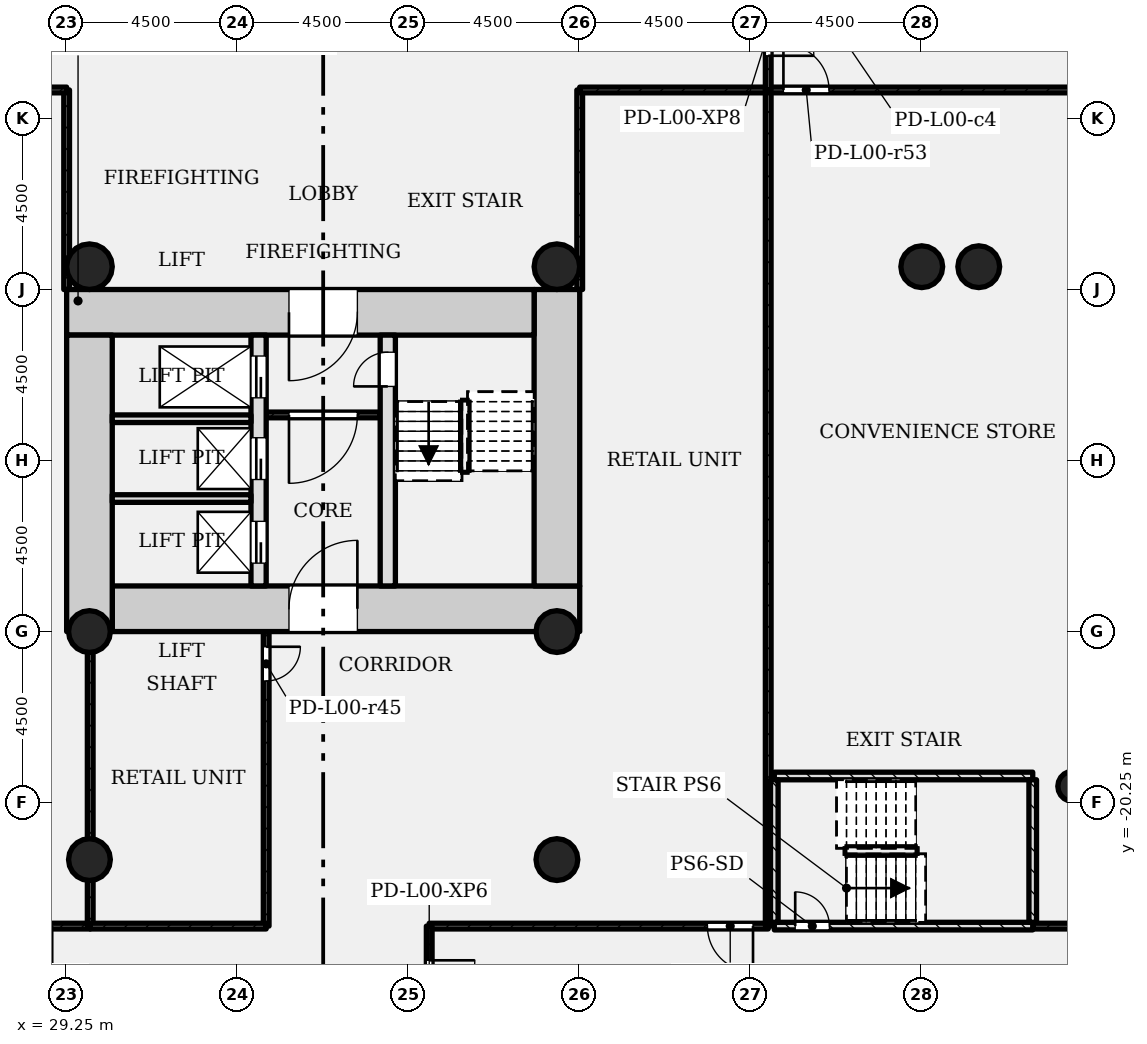
"""IFC4 building model, lengths in metres.
Left out: names, types, materials, properties, quantities, classifications, styles, units other than length and angle.
Written with IfcOpenShell. Run it as: python <this file> out.ifc"""

import sys

from ifc_helpers import new_model, si_unit, direction, frame, frame_2d, origin, origin_2d, place, context, subcontext, project, spatial, rectangle, hollow_circle, extrude, element, fill, save


model = new_model("IFC4")
c1 = context("Model", 3, precision=1e-05, world=origin(), true_north=direction((0.0, 1.0)))
c2 = subcontext(c1, "Body", "Model", "MODEL_VIEW")
j1 = project(units=[si_unit("LENGTHUNIT", "METRE"), si_unit("PLANEANGLEUNIT", "RADIAN")], contexts=[c1])
p1 = place(None, origin())
s1 = spatial("IfcSite", under=j1, at=p1, CompositionType="ELEMENT")
p2 = place(p1, origin())
s2 = spatial("IfcBuilding", under=s1, at=p2, CompositionType="ELEMENT")
p3 = place(p2, origin())
s3 = spatial("IfcBuildingStorey", under=s2, at=p3, CompositionType="ELEMENT", Elevation=0.0)
p4 = place(p3, frame((30.45, -15.15, -0.4), z_axis=(0.0, 0.0, 1.0), x_axis=(1.0, 0.0, 0.0)))
e1 = element("IfcWall", 1, at=p4, inside=s3, PredefinedType="SHEAR", context=c2, shape_type="SweptSolid", body=[
    extrude(rectangle(XDim=12.3, YDim=1.2, at=frame_2d((6.15, 0.0))), origin(), (0.0, 0.0, 1.0), 6.4),
])
p5 = place(p4, frame((4.65, 0.0, 0.4)))
e2 = element("IfcOpeningElement", 2, at=p5, cuts=e1, PredefinedType="OPENING", context=c2, shape_type="SweptSolid", body=[
    extrude(rectangle(XDim=1.8, YDim=2.1, at=frame_2d((0.9, 1.05))), frame((0.0, 0.61, 0.0), z_axis=(0.0, -1.0, 0.0), x_axis=(1.0, 0.0, 0.0)), (0.0, 0.0, 1.0), 1.22),
])
p6 = place(p3, frame((42.15, -14.55, -0.4), z_axis=(0.0, 0.0, 1.0), x_axis=(0.0, 1.0, 0.0)))
e3 = element("IfcWall", 3, at=p6, inside=s3, PredefinedType="SHEAR", context=c2, shape_type="SweptSolid", body=[
    extrude(rectangle(XDim=7.8, YDim=1.2, at=frame_2d((3.9, 0.0))), origin(), (0.0, 0.0, 1.0), 6.4),
])
p7 = place(p3, frame((41.55, -7.35, -0.4), z_axis=(0.0, 0.0, 1.0), x_axis=(-1.0, 0.0, 0.0)))
e4 = element("IfcWall", 4, at=p7, inside=s3, PredefinedType="SHEAR", context=c2, shape_type="SweptSolid", body=[
    extrude(rectangle(XDim=12.3, YDim=1.2, at=frame_2d((6.15, 0.0))), origin(), (0.0, 0.0, 1.0), 6.4),
])
p8 = place(p7, frame((4.65, 0.0, 0.4)))
e5 = element("IfcOpeningElement", 5, at=p8, cuts=e4, PredefinedType="OPENING", context=c2, shape_type="SweptSolid", body=[
    extrude(rectangle(XDim=1.8, YDim=2.1, at=frame_2d((0.9, 1.05))), frame((0.0, 0.61, 0.0), z_axis=(0.0, -1.0, 0.0), x_axis=(1.0, 0.0, 0.0)), (0.0, 0.0, 1.0), 1.22),
])
p9 = place(p3, frame((29.85, -7.95, -0.4), z_axis=(0.0, 0.0, 1.0), x_axis=(0.0, -1.0, 0.0)))
e6 = element("IfcWall", 6, at=p9, inside=s3, PredefinedType="SHEAR", context=c2, shape_type="SweptSolid", body=[
    extrude(rectangle(XDim=7.8, YDim=1.2, at=frame_2d((3.9, 0.0))), origin(), (0.0, 0.0, 1.0), 6.4),
])
p10 = place(p3, frame((34.3, -14.55, -0.4), z_axis=(0.0, 0.0, 1.0), x_axis=(0.0, 1.0, 0.0)))
e7 = element("IfcWall", 7, at=p10, inside=s3, PredefinedType="SHEAR", context=c2, shape_type="SweptSolid", body=[
    extrude(rectangle(XDim=6.6, YDim=0.4, at=frame_2d((3.3, 0.0))), origin(), (0.0, 0.0, 1.0), 6.4),
])
p11 = place(p10, frame((4.95, 0.0, 0.4)))
e8 = element("IfcOpeningElement", 8, at=p11, cuts=e7, PredefinedType="OPENING", context=c2, shape_type="SweptSolid", body=[
    extrude(rectangle(XDim=1.1, YDim=2.1, at=frame_2d((0.55, 1.05))), frame((0.0, 0.21, 0.0), z_axis=(0.0, -1.0, 0.0), x_axis=(1.0, 0.0, 0.0)), (0.0, 0.0, 1.0), 0.42),
])
p12 = place(p10, frame((2.8, 0.0, 0.4)))
e9 = element("IfcOpeningElement", 9, at=p12, cuts=e7, PredefinedType="OPENING", context=c2, shape_type="SweptSolid", body=[
    extrude(rectangle(XDim=1.1, YDim=2.1, at=frame_2d((0.55, 1.05))), frame((0.0, 0.21, 0.0), z_axis=(0.0, -1.0, 0.0), x_axis=(1.0, 0.0, 0.0)), (0.0, 0.0, 1.0), 0.42),
])
p13 = place(p10, frame((0.6, 0.0, 0.4)))
e10 = element("IfcOpeningElement", 10, at=p13, cuts=e7, PredefinedType="OPENING", context=c2, shape_type="SweptSolid", body=[
    extrude(rectangle(XDim=1.1, YDim=2.1, at=frame_2d((0.55, 1.05))), frame((0.0, 0.21, 0.0), z_axis=(0.0, -1.0, 0.0), x_axis=(1.0, 0.0, 0.0)), (0.0, 0.0, 1.0), 0.42),
])
p14 = place(p3, frame((37.7, -14.55, -0.4), z_axis=(0.0, 0.0, 1.0), x_axis=(0.0, 1.0, 0.0)))
e11 = element("IfcWall", 11, at=p14, inside=s3, PredefinedType="SHEAR", context=c2, shape_type="SweptSolid", body=[
    extrude(rectangle(XDim=6.6, YDim=0.4, at=frame_2d((3.3, 0.0))), origin(), (0.0, 0.0, 1.0), 6.4),
])
p15 = place(p14, frame((5.25, 0.0, 0.4)))
e12 = element("IfcOpeningElement", 12, at=p15, cuts=e11, PredefinedType="OPENING", context=c2, shape_type="SweptSolid", body=[
    extrude(rectangle(XDim=0.9, YDim=2.1, at=frame_2d((0.45, 1.05))), frame((0.0, 0.21, 0.0), z_axis=(0.0, -1.0, 0.0), x_axis=(1.0, 0.0, 0.0)), (0.0, 0.0, 1.0), 0.42),
])
for number, where, z_axis, x_axis in (
    (13, (42.15, -15.75, -0.4), (0.0, 0.0, 1.0), (1.0, 0.0, 0.0)),
    (14, (29.85, -15.75, -0.4), (0.0, 0.0, 1.0), (1.0, 0.0, 0.0)),
    (15, (42.15, -21.75, -0.4), (0.0, 0.0, 1.0), (1.0, 0.0, 0.0)),
    (16, (29.85, -21.75, -0.4), (0.0, 0.0, 1.0), (1.0, 0.0, 0.0)),
    (17, (51.75, -6.15, -0.4), (0.0, 0.0, 1.0), (1.0, 0.0, 0.0)),
    (18, (53.25, -6.15, -0.4), (0.0, 0.0, 1.0), (1.0, 0.0, 0.0)),
):
    element("IfcColumn", number, at=place(p3, frame(where, z_axis=z_axis, x_axis=x_axis)), inside=s3, PredefinedType="COLUMN", context=c2, shape_type="SweptSolid", body=[
        extrude(hollow_circle(Radius=0.55, WallThickness=0.04, at=origin_2d()), origin(), (0.0, 0.0, 1.0), 6.4),
    ])
for number, where, z_axis, x_axis in (
    (19, (42.15, -6.15, -0.4), (0.0, 0.0, 1.0), (1.0, 0.0, 0.0)),
    (20, (29.85, -6.15, -0.4), (0.0, 0.0, 1.0), (1.0, 0.0, 0.0)),
):
    element("IfcColumn", number, at=place(p3, frame(where, z_axis=z_axis, x_axis=x_axis)), inside=s3, PredefinedType="COLUMN", context=c2, shape_type="SweptSolid", body=[
        extrude(hollow_circle(Radius=0.6, WallThickness=0.045, at=origin_2d()), origin(), (0.0, 0.0, 1.0), 6.4),
    ])
p16 = place(p3, frame((55.73, -19.821, -0.4), z_axis=(0.0, 0.0, 1.0), x_axis=(1.0, 0.0, 0.0)))
e21 = element("IfcColumn", 21, at=p16, inside=s3, PredefinedType="COLUMN", context=c2, shape_type="SweptSolid", body=[
    extrude(hollow_circle(Radius=0.4, WallThickness=0.028, at=origin_2d()), origin(), (0.0, 0.0, 1.0), 6.4),
])
p17 = place(p3, frame((34.5, -10.05, 0.0), z_axis=(0.0, 0.0, 1.0), x_axis=(1.0, 0.0, 0.0)))
e22 = element("IfcWall", 22, at=p17, inside=s3, PredefinedType="PARTITIONING", context=c2, shape_type="SweptSolid", body=[
    extrude(rectangle(XDim=3.0, YDim=0.15, at=frame_2d((1.5, 0.0))), origin(), (0.0, 0.0, 1.0), 5.58),
])
p18 = place(p17, frame((0.6, 0.0, 0.0)))
e23 = element("IfcOpeningElement", 23, at=p18, cuts=e22, PredefinedType="OPENING", context=c2, shape_type="SweptSolid", body=[
    extrude(rectangle(XDim=1.8, YDim=2.1, at=frame_2d((0.9, 1.05))), frame((0.0, 0.085, 0.0), z_axis=(0.0, -1.0, 0.0), x_axis=(1.0, 0.0, 0.0)), (0.0, 0.0, 1.0), 0.17),
])
for number, where, z_axis, x_axis in (
    (24, (30.45, -10.15, 0.0), (0.0, 0.0, 1.0), (1.0, 0.0, 0.0)),
    (25, (30.45, -12.25, 0.0), (0.0, 0.0, 1.0), (1.0, 0.0, 0.0)),
):
    element("IfcWall", number, at=place(p3, frame(where, z_axis=z_axis, x_axis=x_axis)), inside=s3, PredefinedType="SOLIDWALL", context=c2, shape_type="SweptSolid", body=[
        extrude(rectangle(XDim=3.65, YDim=0.2, at=frame_2d((1.825, 0.0))), origin(), (0.0, 0.0, 1.0), 5.58),
    ])
p19 = place(p3, frame((29.25, -1.5, 0.0), z_axis=(0.0, 0.0, 1.0), x_axis=(0.0, -1.0, 0.0)))
e26 = element("IfcWall", 26, at=p19, inside=s3, PredefinedType="PARTITIONING", context=c2, shape_type="SweptSolid", body=[
    extrude(rectangle(XDim=5.25, YDim=0.15, at=frame_2d((2.625, 0.0))), origin(), (0.0, 0.0, 1.0), 5.58),
])
p20 = place(p3, frame((29.87, -23.5, 0.0), z_axis=(0.0, 0.0, 1.0), x_axis=(-1.0, 0.0, 0.0)))
e27 = element("IfcWall", 27, at=p20, inside=s3, PredefinedType="PARTITIONING", context=c2, shape_type="SweptSolid", body=[
    extrude(rectangle(XDim=8.92, YDim=0.15, at=frame_2d((4.46, 0.0))), origin(), (0.0, 0.0, 1.0), 5.58),
])
p21 = place(p20, frame((1.0, 0.0, 0.0)))
e28 = element("IfcOpeningElement", 28, at=p21, cuts=e27, PredefinedType="OPENING", context=c2, shape_type="SweptSolid", body=[
    extrude(rectangle(XDim=1.2, YDim=2.1, at=frame_2d((0.6, 1.05))), frame((0.0, 0.085, 0.0), z_axis=(0.0, -1.0, 0.0), x_axis=(1.0, 0.0, 0.0)), (0.0, 0.0, 1.0), 0.17),
])
p22 = place(p3, frame((20.95, -1.5, 0.0), z_axis=(0.0, 0.0, 1.0), x_axis=(1.0, 0.0, 0.0)))
e29 = element("IfcWall", 29, at=p22, inside=s3, PredefinedType="PARTITIONING", context=c2, shape_type="SweptSolid", body=[
    extrude(rectangle(XDim=8.3, YDim=0.15, at=frame_2d((4.15, 0.0))), origin(), (0.0, 0.0, 1.0), 5.58),
])
p23 = place(p3, frame((29.87, -15.75, 0.0), z_axis=(0.0, 0.0, 1.0), x_axis=(0.0, -1.0, 0.0)))
e30 = element("IfcWall", 30, at=p23, inside=s3, PredefinedType="PARTITIONING", context=c2, shape_type="SweptSolid", body=[
    extrude(rectangle(XDim=7.75, YDim=0.15, at=frame_2d((3.875, 0.0))), origin(), (0.0, 0.0, 1.0), 5.58),
])
p24 = place(p3, frame((34.5, -15.75, 0.0), z_axis=(0.0, 0.0, 1.0), x_axis=(0.0, -1.0, 0.0)))
e31 = element("IfcWall", 31, at=p24, inside=s3, PredefinedType="PARTITIONING", context=c2, shape_type="SweptSolid", body=[
    extrude(rectangle(XDim=7.75, YDim=0.15, at=frame_2d((3.875, 0.0))), origin(), (0.0, 0.0, 1.0), 5.58),
])
p25 = place(p24, frame((0.4, 0.0, 0.0)))
e32 = element("IfcOpeningElement", 32, at=p25, cuts=e31, PredefinedType="OPENING", context=c2, shape_type="SweptSolid", body=[
    extrude(rectangle(XDim=0.9, YDim=2.1, at=frame_2d((0.45, 1.05))), frame((0.0, 0.085, 0.0), z_axis=(0.0, -1.0, 0.0), x_axis=(1.0, 0.0, 0.0)), (0.0, 0.0, 1.0), 0.17),
])
p26 = place(p3, frame((34.5, -23.5, 0.0), z_axis=(0.0, 0.0, 1.0), x_axis=(-1.0, 0.0, 0.0)))
e33 = element("IfcWall", 33, at=p26, inside=s3, PredefinedType="PARTITIONING", context=c2, shape_type="SweptSolid", body=[
    extrude(rectangle(XDim=4.63, YDim=0.15, at=frame_2d((2.315, 0.0))), origin(), (0.0, 0.0, 1.0), 5.58),
])
p27 = place(p3, frame((42.75, -6.75, 0.0), z_axis=(0.0, 0.0, 1.0), x_axis=(0.0, 1.0, 0.0)))
e34 = element("IfcWall", 34, at=p27, inside=s3, PredefinedType="PARTITIONING", context=c2, shape_type="SweptSolid", body=[
    extrude(rectangle(XDim=5.25, YDim=0.15, at=frame_2d((2.625, 0.0))), origin(), (0.0, 0.0, 1.0), 5.58),
])
p28 = place(p3, frame((42.75, -1.5, 0.0), z_axis=(0.0, 0.0, 1.0), x_axis=(1.0, 0.0, 0.0)))
e35 = element("IfcWall", 35, at=p28, inside=s3, PredefinedType="PARTITIONING", context=c2, shape_type="SweptSolid", body=[
    extrude(rectangle(XDim=4.96, YDim=0.15, at=frame_2d((2.48, 0.0))), origin(), (0.0, 0.0, 1.0), 5.58),
])
p29 = place(p3, frame((47.71, -23.5, 0.0), z_axis=(0.0, 0.0, 1.0), x_axis=(-1.0, 0.0, 0.0)))
e36 = element("IfcWall", 36, at=p29, inside=s3, PredefinedType="PARTITIONING", context=c2, shape_type="SweptSolid", body=[
    extrude(rectangle(XDim=8.92, YDim=0.15, at=frame_2d((4.46, 0.0))), origin(), (0.0, 0.0, 1.0), 5.58),
])
p30 = place(p29, frame((0.4, 0.0, 0.0)))
e37 = element("IfcOpeningElement", 37, at=p30, cuts=e36, PredefinedType="OPENING", context=c2, shape_type="SweptSolid", body=[
    extrude(rectangle(XDim=1.2, YDim=2.1, at=frame_2d((0.6, 1.05))), frame((0.0, 0.085, 0.0), z_axis=(0.0, -1.0, 0.0), x_axis=(1.0, 0.0, 0.0)), (0.0, 0.0, 1.0), 0.17),
])
p31 = place(p3, frame((47.71, -1.5, 0.0), z_axis=(0.0, 0.0, 1.0), x_axis=(0.0, -1.0, 0.0)))
e38 = element("IfcWall", 38, at=p31, inside=s3, PredefinedType="PARTITIONING", context=c2, shape_type="SweptSolid", body=[
    extrude(rectangle(XDim=22.0, YDim=0.15, at=frame_2d((11.0, 0.0))), origin(), (0.0, 0.0, 1.0), 5.58),
])
p32 = place(p3, frame((56.63, -23.5, 0.0), z_axis=(0.0, 0.0, 1.0), x_axis=(-1.0, 0.0, 0.0)))
e39 = element("IfcWall", 39, at=p32, inside=s3, PredefinedType="PARTITIONING", context=c2, shape_type="SweptSolid", body=[
    extrude(rectangle(XDim=1.96, YDim=0.15, at=frame_2d((0.98, 0.0))), origin(), (0.0, 0.0, 1.0), 5.58),
])
p33 = place(p3, frame((47.71, -1.5, 0.0), z_axis=(0.0, 0.0, 1.0), x_axis=(1.0, 0.0, 0.0)))
e40 = element("IfcWall", 40, at=p33, inside=s3, PredefinedType="PARTITIONING", context=c2, shape_type="SweptSolid", body=[
    extrude(rectangle(XDim=8.92, YDim=0.15, at=frame_2d((4.46, 0.0))), origin(), (0.0, 0.0, 1.0), 5.58),
])
p34 = place(p33, frame((0.4, 0.0, 0.0)))
e41 = element("IfcOpeningElement", 41, at=p34, cuts=e40, PredefinedType="OPENING", context=c2, shape_type="SweptSolid", body=[
    extrude(rectangle(XDim=1.2, YDim=2.1, at=frame_2d((0.6, 1.05))), frame((0.0, 0.085, 0.0), z_axis=(0.0, -1.0, 0.0), x_axis=(1.0, 0.0, 0.0)), (0.0, 0.0, 1.0), 0.17),
])
p35 = place(p3, frame((38.79, -26.5, 0.0), z_axis=(0.0, 0.0, 1.0), x_axis=(0.0, 1.0, 0.0)))
e42 = element("IfcWall", 42, at=p35, inside=s3, PredefinedType="PARTITIONING", context=c2, shape_type="SweptSolid", body=[
    extrude(rectangle(XDim=3.0, YDim=0.15, at=frame_2d((1.5, 0.0))), origin(), (0.0, 0.0, 1.0), 5.58),
])
p36 = place(p35, frame((0.9, 0.0, 0.0)))
e43 = element("IfcOpeningElement", 43, at=p36, cuts=e42, PredefinedType="OPENING", context=c2, shape_type="SweptSolid", body=[
    extrude(rectangle(XDim=1.2, YDim=2.1, at=frame_2d((0.6, 1.05))), frame((0.0, 0.085, 0.0), z_axis=(0.0, -1.0, 0.0), x_axis=(1.0, 0.0, 0.0)), (0.0, 0.0, 1.0), 0.17),
])
p37 = place(p3, frame((47.71, -1.5, 0.0), z_axis=(0.0, 0.0, 1.0), x_axis=(0.0, 1.0, 0.0)))
e44 = element("IfcWall", 44, at=p37, inside=s3, PredefinedType="PARTITIONING", context=c2, shape_type="SweptSolid", body=[
    extrude(rectangle(XDim=3.0, YDim=0.15, at=frame_2d((1.5, 0.0))), origin(), (0.0, 0.0, 1.0), 5.58),
])
p38 = place(p37, frame((0.9, 0.0, 0.0)))
e45 = element("IfcOpeningElement", 45, at=p38, cuts=e44, PredefinedType="OPENING", context=c2, shape_type="SweptSolid", body=[
    extrude(rectangle(XDim=1.2, YDim=2.1, at=frame_2d((0.6, 1.05))), frame((0.0, 0.085, 0.0), z_axis=(0.0, -1.0, 0.0), x_axis=(1.0, 0.0, 0.0)), (0.0, 0.0, 1.0), 0.17),
])
p39 = place(p3, frame((47.87, -23.5, 0.0), z_axis=(0.0, 0.0, 1.0), x_axis=(1.0, 0.0, 0.0)))
e46 = element("IfcWall", 46, at=p39, inside=s3, PredefinedType="SHEAR", context=c2, shape_type="SweptSolid", body=[
    extrude(rectangle(XDim=6.8, YDim=0.2, at=frame_2d((3.4, 0.0))), origin(), (0.0, 0.0, 1.0), 5.58),
])
p40 = place(p39, frame((0.55, 0.0, 0.0)))
e47 = element("IfcOpeningElement", 47, at=p40, cuts=e46, PredefinedType="OPENING", context=c2, shape_type="SweptSolid", body=[
    extrude(rectangle(XDim=0.9, YDim=2.1, at=frame_2d((0.45, 1.05))), frame((0.0, 0.11, 0.0), z_axis=(0.0, -1.0, 0.0), x_axis=(1.0, 0.0, 0.0)), (0.0, 0.0, 1.0), 0.22),
])
p41 = place(p3, frame((47.87, -19.55, 0.0), z_axis=(0.0, 0.0, 1.0), x_axis=(1.0, 0.0, 0.0)))
e48 = element("IfcWall", 48, at=p41, inside=s3, PredefinedType="SHEAR", context=c2, shape_type="SweptSolid", body=[
    extrude(rectangle(XDim=6.8, YDim=0.2, at=frame_2d((3.4, 0.0))), origin(), (0.0, 0.0, 1.0), 5.58),
])
for number, where, z_axis, x_axis in (
    (49, (47.87, -23.4, 0.0), (0.0, 0.0, 1.0), (0.0, 1.0, 0.0)),
    (50, (54.67, -23.4, 0.0), (0.0, 0.0, 1.0), (0.0, 1.0, 0.0)),
):
    element("IfcWall", number, at=place(p3, frame(where, z_axis=z_axis, x_axis=x_axis)), inside=s3, PredefinedType="SHEAR", context=c2, shape_type="SweptSolid", body=[
        extrude(rectangle(XDim=3.75, YDim=0.2, at=frame_2d((1.875, 0.0))), origin(), (0.0, 0.0, 1.0), 5.58),
    ])
p42 = place(p18, origin())
e51 = element("IfcDoor", 51, at=p42, inside=s3, OperationType="SINGLE_SWING_LEFT", PredefinedType="DOOR", context=c2, shape_type="SweptSolid", body=[
    extrude(rectangle(XDim=1.8, YDim=2.1, at=frame_2d((0.9, 1.05))), frame((0.0, 0.025, 0.0), z_axis=(0.0, -1.0, 0.0), x_axis=(1.0, 0.0, 0.0)), (0.0, 0.0, 1.0), 0.05),
])
fill(e23, e51)
p43 = place(p25, origin())
e52 = element("IfcDoor", 52, at=p43, inside=s3, OperationType="SINGLE_SWING_RIGHT", PredefinedType="DOOR", context=c2, shape_type="SweptSolid", body=[
    extrude(rectangle(XDim=0.9, YDim=2.1, at=frame_2d((0.45, 1.05))), frame((0.0, 0.025, 0.0), z_axis=(0.0, -1.0, 0.0), x_axis=(1.0, 0.0, 0.0)), (0.0, 0.0, 1.0), 0.05),
])
fill(e32, e52)
p44 = place(p30, origin())
e53 = element("IfcDoor", 53, at=p44, inside=s3, OperationType="SINGLE_SWING_RIGHT", PredefinedType="DOOR", context=c2, shape_type="SweptSolid", body=[
    extrude(rectangle(XDim=1.2, YDim=2.1, at=frame_2d((0.6, 1.05))), frame((0.0, 0.025, 0.0), z_axis=(0.0, -1.0, 0.0), x_axis=(1.0, 0.0, 0.0)), (0.0, 0.0, 1.0), 0.05),
])
fill(e37, e53)
p45 = place(p34, origin())
e54 = element("IfcDoor", 54, at=p45, inside=s3, OperationType="SINGLE_SWING_RIGHT", PredefinedType="DOOR", context=c2, shape_type="SweptSolid", body=[
    extrude(rectangle(XDim=1.2, YDim=2.1, at=frame_2d((0.6, 1.05))), frame((0.0, 0.025, 0.0), z_axis=(0.0, -1.0, 0.0), x_axis=(1.0, 0.0, 0.0)), (0.0, 0.0, 1.0), 0.05),
])
fill(e41, e54)
p46 = place(p36, origin())
e55 = element("IfcDoor", 55, at=p46, inside=s3, OperationType="SINGLE_SWING_RIGHT", PredefinedType="DOOR", context=c2, shape_type="SweptSolid", body=[
    extrude(rectangle(XDim=1.2, YDim=2.1, at=frame_2d((0.6, 1.05))), frame((0.0, 0.025, 0.0), z_axis=(0.0, -1.0, 0.0), x_axis=(1.0, 0.0, 0.0)), (0.0, 0.0, 1.0), 0.05),
])
fill(e43, e55)
p47 = place(p38, origin())
e56 = element("IfcDoor", 56, at=p47, inside=s3, OperationType="SINGLE_SWING_LEFT", PredefinedType="DOOR", context=c2, shape_type="SweptSolid", body=[
    extrude(rectangle(XDim=1.2, YDim=2.1, at=frame_2d((0.6, 1.05))), frame((0.0, 0.025, 0.0), z_axis=(0.0, -1.0, 0.0), x_axis=(1.0, 0.0, 0.0)), (0.0, 0.0, 1.0), 0.05),
])
fill(e45, e56)
p48 = place(p40, origin())
e57 = element("IfcDoor", 57, at=p48, inside=s3, OperationType="SINGLE_SWING_RIGHT", PredefinedType="DOOR", context=c2, shape_type="SweptSolid", body=[
    extrude(rectangle(XDim=0.9, YDim=2.1, at=frame_2d((0.45, 1.05))), frame((0.0, 0.025, 0.0), z_axis=(0.0, -1.0, 0.0), x_axis=(1.0, 0.0, 0.0)), (0.0, 0.0, 1.0), 0.05),
])
fill(e47, e57)
p49 = place(p15, origin())
e58 = element("IfcDoor", 58, at=p49, inside=s3, OperationType="SINGLE_SWING_RIGHT", PredefinedType="DOOR", context=c2, shape_type="SweptSolid", body=[
    extrude(rectangle(XDim=0.9, YDim=2.1, at=frame_2d((0.45, 1.05))), frame((0.0, 0.025, 0.0), z_axis=(0.0, -1.0, 0.0), x_axis=(1.0, 0.0, 0.0)), (0.0, 0.0, 1.0), 0.05),
])
fill(e12, e58)
p50 = place(p11, origin())
e59 = element("IfcDoor", 59, at=p50, inside=s3, OperationType="SLIDING_TO_LEFT", PredefinedType="DOOR", context=c2, shape_type="SweptSolid", body=[
    extrude(rectangle(XDim=1.1, YDim=2.1, at=frame_2d((0.55, 1.05))), frame((0.0, 0.025, 0.0), z_axis=(0.0, -1.0, 0.0), x_axis=(1.0, 0.0, 0.0)), (0.0, 0.0, 1.0), 0.05),
])
fill(e8, e59)
p51 = place(p12, origin())
e60 = element("IfcDoor", 60, at=p51, inside=s3, OperationType="SLIDING_TO_LEFT", PredefinedType="DOOR", context=c2, shape_type="SweptSolid", body=[
    extrude(rectangle(XDim=1.1, YDim=2.1, at=frame_2d((0.55, 1.05))), frame((0.0, 0.025, 0.0), z_axis=(0.0, -1.0, 0.0), x_axis=(1.0, 0.0, 0.0)), (0.0, 0.0, 1.0), 0.05),
])
fill(e9, e60)
p52 = place(p13, origin())
e61 = element("IfcDoor", 61, at=p52, inside=s3, OperationType="SLIDING_TO_LEFT", PredefinedType="DOOR", context=c2, shape_type="SweptSolid", body=[
    extrude(rectangle(XDim=1.1, YDim=2.1, at=frame_2d((0.55, 1.05))), frame((0.0, 0.025, 0.0), z_axis=(0.0, -1.0, 0.0), x_axis=(1.0, 0.0, 0.0)), (0.0, 0.0, 1.0), 0.05),
])
fill(e10, e61)
p53 = place(p8, origin())
e62 = element("IfcDoor", 62, at=p53, inside=s3, OperationType="SINGLE_SWING_LEFT", PredefinedType="DOOR", context=c2, shape_type="SweptSolid", body=[
    extrude(rectangle(XDim=1.8, YDim=2.1, at=frame_2d((0.9, 1.05))), frame((0.0, 0.025, 0.0), z_axis=(0.0, -1.0, 0.0), x_axis=(1.0, 0.0, 0.0)), (0.0, 0.0, 1.0), 0.05),
])
fill(e5, e62)
p54 = place(p5, origin())
e63 = element("IfcDoor", 63, at=p54, inside=s3, OperationType="SINGLE_SWING_LEFT", PredefinedType="DOOR", context=c2, shape_type="SweptSolid", body=[
    extrude(rectangle(XDim=1.8, YDim=2.1, at=frame_2d((0.9, 1.05))), frame((0.0, 0.025, 0.0), z_axis=(0.0, -1.0, 0.0), x_axis=(1.0, 0.0, 0.0)), (0.0, 0.0, 1.0), 0.05),
])
fill(e2, e63)
save(model, sys.argv[1])
